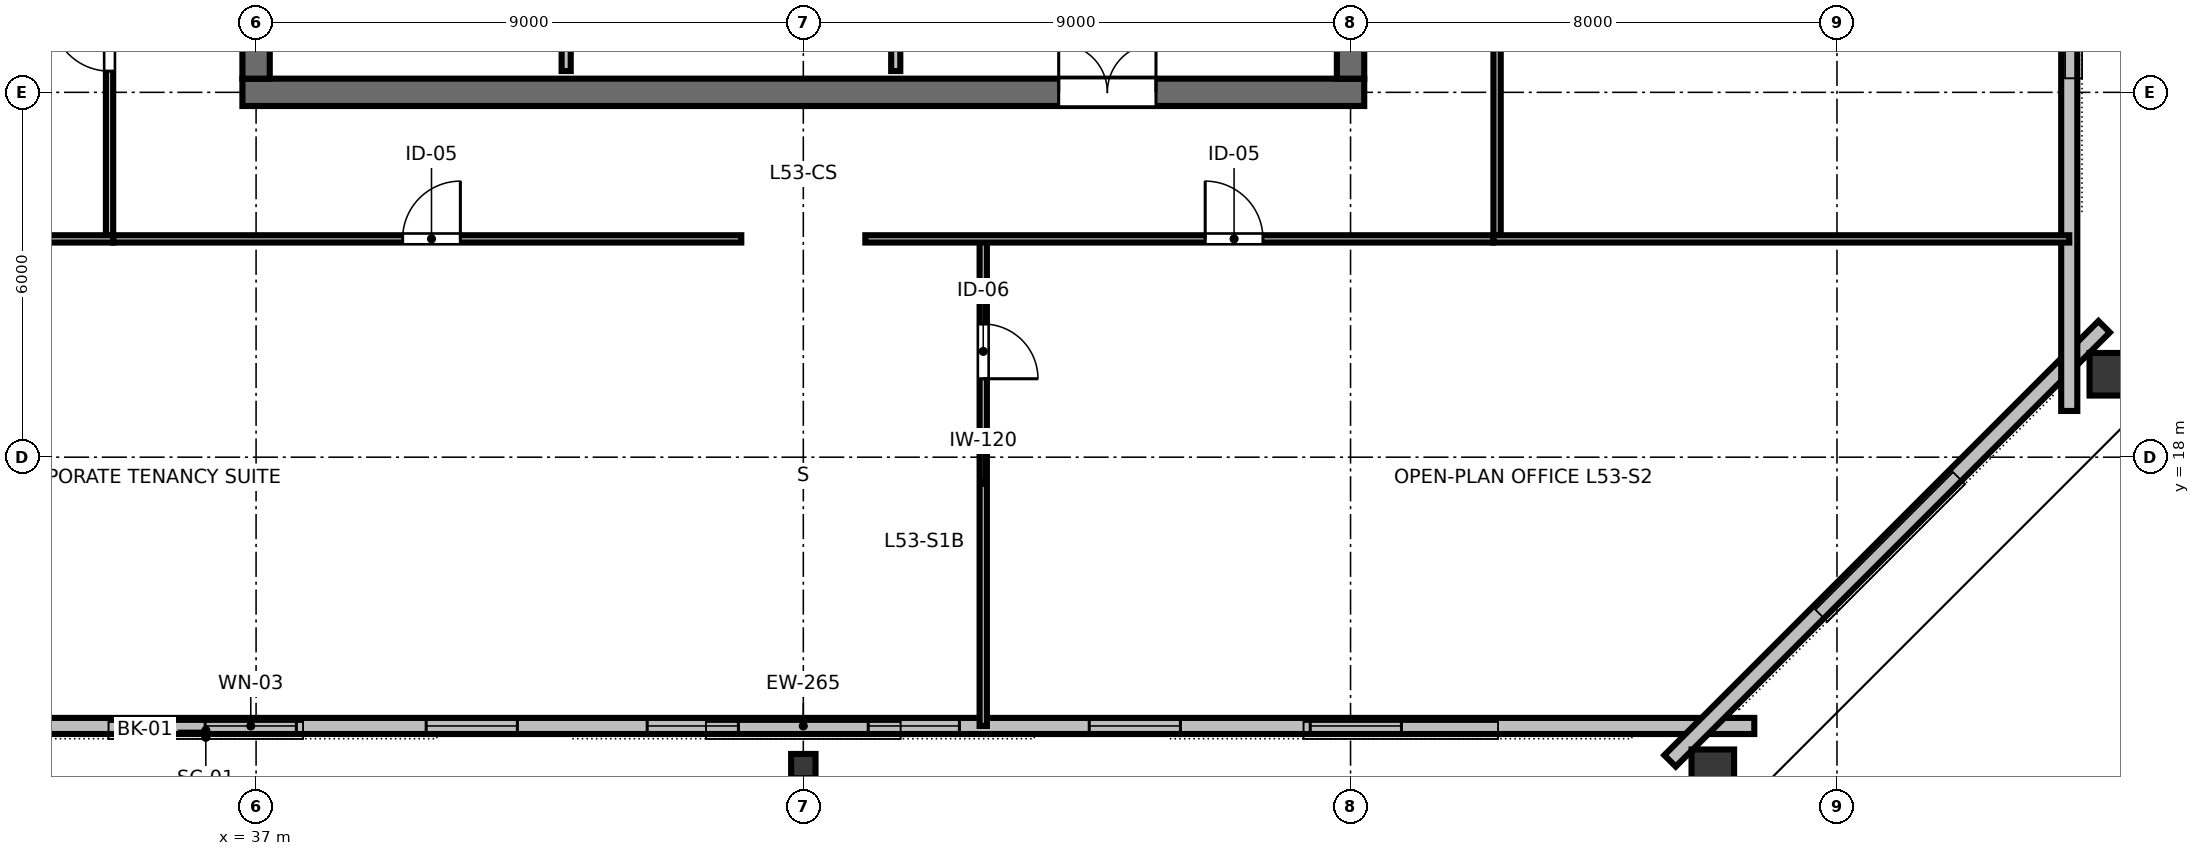
"""IFC4 building model, lengths in metres.
Left out: names, types, materials, properties, quantities, classifications, styles, units other than length and angle.
Written with IfcOpenShell. Run it as: python <this file> out.ifc"""

import sys

from ifc_helpers import new_model, si_unit, direction, frame, frame_2d, origin, origin_2d, place, context, subcontext, project, spatial, rectangle, hollow_rectangle, i_section, extrude, element, fill, save


model = new_model("IFC4")
c1 = context("Model", 3, precision=1e-05, world=origin(), true_north=direction((0.0, 1.0)))
c2 = subcontext(c1, "Body", "Model", "MODEL_VIEW")
j1 = project(units=[si_unit("LENGTHUNIT", "METRE"), si_unit("PLANEANGLEUNIT", "RADIAN")], contexts=[c1])
p1 = place(None, origin())
s1 = spatial("IfcSite", under=j1, at=p1, CompositionType="ELEMENT")
p2 = place(p1, origin())
s2 = spatial("IfcBuilding", under=s1, at=p2, CompositionType="ELEMENT")
p3 = place(p2, frame((0.0, 0.0, 202.2)))
s3 = spatial("IfcBuildingStorey", under=s2, at=p3, CompositionType="ELEMENT", Elevation=202.2)
p4 = place(p3, frame((36.775, 24.0, 0.0), z_axis=(0.0, 0.0, 1.0), x_axis=(1.0, 0.0, 0.0)))
e1 = element("IfcWall", 1, at=p4, inside=s3, PredefinedType="SHEAR", context=c2, shape_type="SweptSolid", body=[
    extrude(rectangle(XDim=18.45, YDim=0.45, at=frame_2d((9.225, 0.0))), origin(), (0.0, 0.0, 1.0), 3.36),
])
p5 = place(p4, frame((13.425, 0.0, 0.0)))
e2 = element("IfcOpeningElement", 2, at=p5, cuts=e1, PredefinedType="OPENING", context=c2, shape_type="SweptSolid", body=[
    extrude(rectangle(XDim=1.6, YDim=2.15, at=frame_2d((0.8, 1.075))), frame((0.0, 0.235, 0.0), z_axis=(0.0, -1.0, 0.0), x_axis=(1.0, 0.0, 0.0)), (0.0, 0.0, 1.0), 0.47),
])
p6 = place(p3, frame((37.0, 24.225, 0.0), z_axis=(0.0, 0.0, 1.0), x_axis=(0.0, 1.0, 0.0)))
e3 = element("IfcWall", 3, at=p6, inside=s3, PredefinedType="SHEAR", context=c2, shape_type="SweptSolid", body=[
    extrude(rectangle(XDim=15.55, YDim=0.45, at=frame_2d((7.775, 0.0))), origin(), (0.0, 0.0, 1.0), 3.36),
])
p7 = place(p6, frame((5.3, 0.0, 0.0)))
e4 = element("IfcOpeningElement", 4, at=p7, cuts=e3, PredefinedType="OPENING", context=c2, shape_type="SweptSolid", body=[
    extrude(rectangle(XDim=1.15, YDim=2.15, at=frame_2d((0.575, 1.075))), frame((0.0, 0.235, 0.0), z_axis=(0.0, -1.0, 0.0), x_axis=(1.0, 0.0, 0.0)), (0.0, 0.0, 1.0), 0.47),
])
p8 = place(p3, frame((55.0, 24.225, 0.0), z_axis=(0.0, 0.0, 1.0), x_axis=(0.0, 1.0, 0.0)))
e5 = element("IfcWall", 5, at=p8, inside=s3, PredefinedType="SHEAR", context=c2, shape_type="SweptSolid", body=[
    extrude(rectangle(XDim=15.55, YDim=0.45, at=frame_2d((7.775, 0.0))), origin(), (0.0, 0.0, 1.0), 3.36),
])
p9 = place(p8, frame((5.3, 0.0, 0.0)))
e6 = element("IfcOpeningElement", 6, at=p9, cuts=e5, PredefinedType="OPENING", context=c2, shape_type="SweptSolid", body=[
    extrude(rectangle(XDim=1.15, YDim=2.15, at=frame_2d((0.575, 1.075))), frame((0.0, 0.235, 0.0), z_axis=(0.0, -1.0, 0.0), x_axis=(1.0, 0.0, 0.0)), (0.0, 0.0, 1.0), 0.47),
])
p10 = place(p3, frame((46.0, 12.92, 0.0), z_axis=(0.0, 0.0, 1.0), x_axis=(1.0, 0.0, 0.0)))
e7 = element("IfcColumn", 7, at=p10, inside=s3, PredefinedType="COLUMN", context=c2, shape_type="SweptSolid", body=[
    extrude(i_section(OverallWidth=0.401, OverallDepth=0.399, WebThickness=0.025, FlangeThickness=0.04, FilletRadius=0.025, at=origin_2d()), origin(), (0.0, 0.0, 1.0), 3.373),
])
for number, where, z_axis, x_axis in (
    (8, (60.958, 12.768, 0.0), (0.0, 0.0, 1.0), (1.0, 0.0, 0.0)),
    (9, (67.579, 19.364, 0.0), (0.0, 0.0, 1.0), (0.0, 1.0, 0.0)),
):
    element("IfcColumn", number, at=place(p3, frame(where, z_axis=z_axis, x_axis=x_axis)), inside=s3, PredefinedType="COLUMN", context=c2, shape_type="SweptSolid", body=[
        extrude(hollow_rectangle(XDim=0.7, YDim=0.85, WallThickness=0.04, at=origin_2d()), origin(), (0.0, 0.0, 1.0), 3.373),
    ])
p11 = place(p3, frame((30.36, 13.58, 0.0), z_axis=(0.0, 0.0, 1.0), x_axis=(1.0, 0.0, 0.0)))
e10 = element("IfcWall", 10, at=p11, inside=s3, PredefinedType="STANDARD", context=c2, shape_type="SweptSolid", body=[
    extrude(rectangle(XDim=31.28, YDim=0.265, at=frame_2d((15.64, 0.0))), origin(), (0.0, 0.0, 1.0), 3.375),
])
p12 = place(p11, frame((5.802, 0.0, 0.85)))
e11 = element("IfcOpeningElement", 11, at=p12, cuts=e10, PredefinedType="OPENING", context=c2, shape_type="SweptSolid", body=[
    extrude(rectangle(XDim=1.5, YDim=1.85, at=frame_2d((0.75, 0.925))), frame((0.0, 0.142, 0.0), z_axis=(0.0, -1.0, 0.0), x_axis=(1.0, 0.0, 0.0)), (0.0, 0.0, 1.0), 0.285),
])
p13 = place(p11, frame((9.438, 0.0, 0.85)))
e12 = element("IfcOpeningElement", 12, at=p13, cuts=e10, PredefinedType="OPENING", context=c2, shape_type="SweptSolid", body=[
    extrude(rectangle(XDim=1.5, YDim=1.85, at=frame_2d((0.75, 0.925))), frame((0.0, 0.142, 0.0), z_axis=(0.0, -1.0, 0.0), x_axis=(1.0, 0.0, 0.0)), (0.0, 0.0, 1.0), 0.285),
])
p14 = place(p11, frame((13.073, 0.0, 0.85)))
e13 = element("IfcOpeningElement", 13, at=p14, cuts=e10, PredefinedType="OPENING", context=c2, shape_type="SweptSolid", body=[
    extrude(rectangle(XDim=1.5, YDim=1.85, at=frame_2d((0.75, 0.925))), frame((0.0, 0.142, 0.0), z_axis=(0.0, -1.0, 0.0), x_axis=(1.0, 0.0, 0.0)), (0.0, 0.0, 1.0), 0.285),
])
p15 = place(p11, frame((16.708, 0.0, 0.85)))
e14 = element("IfcOpeningElement", 14, at=p15, cuts=e10, PredefinedType="OPENING", context=c2, shape_type="SweptSolid", body=[
    extrude(rectangle(XDim=1.5, YDim=1.85, at=frame_2d((0.75, 0.925))), frame((0.0, 0.142, 0.0), z_axis=(0.0, -1.0, 0.0), x_axis=(1.0, 0.0, 0.0)), (0.0, 0.0, 1.0), 0.285),
])
p16 = place(p11, frame((20.343, 0.0, 0.85)))
e15 = element("IfcOpeningElement", 15, at=p16, cuts=e10, PredefinedType="OPENING", context=c2, shape_type="SweptSolid", body=[
    extrude(rectangle(XDim=1.5, YDim=1.85, at=frame_2d((0.75, 0.925))), frame((0.0, 0.142, 0.0), z_axis=(0.0, -1.0, 0.0), x_axis=(1.0, 0.0, 0.0)), (0.0, 0.0, 1.0), 0.285),
])
p17 = place(p11, frame((23.978, 0.0, 0.85)))
e16 = element("IfcOpeningElement", 16, at=p17, cuts=e10, PredefinedType="OPENING", context=c2, shape_type="SweptSolid", body=[
    extrude(rectangle(XDim=1.5, YDim=1.85, at=frame_2d((0.75, 0.925))), frame((0.0, 0.142, 0.0), z_axis=(0.0, -1.0, 0.0), x_axis=(1.0, 0.0, 0.0)), (0.0, 0.0, 1.0), 0.285),
])
p18 = place(p3, frame((60.254, 13.006, 0.0), z_axis=(0.0, 0.0, 1.0), x_axis=(0.707106781187, 0.707106781187, 0.0)))
e17 = element("IfcWall", 17, at=p18, inside=s3, PredefinedType="STANDARD", context=c2, shape_type="SweptSolid", body=[
    extrude(rectangle(XDim=10.097, YDim=0.265, at=frame_2d((5.048, 0.0))), origin(), (0.0, 0.0, 1.0), 3.375),
])
p19 = place(p3, frame((66.82, 18.76, 0.0), z_axis=(0.0, 0.0, 1.0), x_axis=(0.0, 1.0, 0.0)))
e18 = element("IfcWall", 18, at=p19, inside=s3, PredefinedType="STANDARD", context=c2, shape_type="SweptSolid", body=[
    extrude(rectangle(XDim=26.48, YDim=0.265, at=frame_2d((13.24, 0.0))), origin(), (0.0, 0.0, 1.0), 3.375),
])
p20 = place(p19, frame((6.42, 0.0, 0.85)))
e19 = element("IfcOpeningElement", 19, at=p20, cuts=e18, PredefinedType="OPENING", context=c2, shape_type="SweptSolid", body=[
    extrude(rectangle(XDim=1.5, YDim=1.85, at=frame_2d((0.75, 0.925))), frame((0.0, 0.142, 0.0), z_axis=(0.0, -1.0, 0.0), x_axis=(1.0, 0.0, 0.0)), (0.0, 0.0, 1.0), 0.285),
])
p21 = place(p19, frame((10.467, 0.0, 0.85)))
e20 = element("IfcOpeningElement", 20, at=p21, cuts=e18, PredefinedType="OPENING", context=c2, shape_type="SweptSolid", body=[
    extrude(rectangle(XDim=1.5, YDim=1.85, at=frame_2d((0.75, 0.925))), frame((0.0, 0.142, 0.0), z_axis=(0.0, -1.0, 0.0), x_axis=(1.0, 0.0, 0.0)), (0.0, 0.0, 1.0), 0.285),
])
p22 = place(p19, frame((18.56, 0.0, 0.85)))
e21 = element("IfcOpeningElement", 21, at=p22, cuts=e18, PredefinedType="OPENING", context=c2, shape_type="SweptSolid", body=[
    extrude(rectangle(XDim=1.5, YDim=1.85, at=frame_2d((0.75, 0.925))), frame((0.0, 0.142, 0.0), z_axis=(0.0, -1.0, 0.0), x_axis=(1.0, 0.0, 0.0)), (0.0, 0.0, 1.0), 0.285),
])
p23 = place(p3, frame((42.1, 24.35, 0.0), z_axis=(0.0, 0.0, 1.0), x_axis=(0.0, 1.0, 0.0)))
e22 = element("IfcWall", 22, at=p23, inside=s3, PredefinedType="PARTITIONING", context=c2, shape_type="SweptSolid", body=[
    extrude(rectangle(XDim=3.9, YDim=0.15, at=frame_2d((1.95, 0.0))), origin(), (0.0, 0.0, 1.0), 3.375),
])
p24 = place(p23, frame((1.5, 0.0, 0.0)))
e23 = element("IfcOpeningElement", 23, at=p24, cuts=e22, PredefinedType="OPENING", context=c2, shape_type="SweptSolid", body=[
    extrude(rectangle(XDim=0.9, YDim=2.15, at=frame_2d((0.45, 1.075))), frame((0.0, 0.085, 0.0), z_axis=(0.0, -1.0, 0.0), x_axis=(1.0, 0.0, 0.0)), (0.0, 0.0, 1.0), 0.17),
])
p25 = place(p3, frame((47.52, 24.35, 0.0), z_axis=(0.0, 0.0, 1.0), x_axis=(0.0, 1.0, 0.0)))
e24 = element("IfcWall", 24, at=p25, inside=s3, PredefinedType="PARTITIONING", context=c2, shape_type="SweptSolid", body=[
    extrude(rectangle(XDim=3.9, YDim=0.15, at=frame_2d((1.95, 0.0))), origin(), (0.0, 0.0, 1.0), 3.375),
])
p26 = place(p25, frame((0.35, 0.0, 0.0)))
e25 = element("IfcOpeningElement", 25, at=p26, cuts=e24, PredefinedType="OPENING", context=c2, shape_type="SweptSolid", body=[
    extrude(rectangle(XDim=0.9, YDim=2.15, at=frame_2d((0.45, 1.075))), frame((0.0, 0.085, 0.0), z_axis=(0.0, -1.0, 0.0), x_axis=(1.0, 0.0, 0.0)), (0.0, 0.0, 1.0), 0.17),
])
p27 = place(p3, frame((48.959, 21.59, 0.0), z_axis=(0.0, 0.0, 1.0), x_axis=(0.0, -1.0, 0.0)))
e26 = element("IfcWall", 26, at=p27, inside=s3, PredefinedType="PARTITIONING", context=c2, shape_type="SweptSolid", body=[
    extrude(rectangle(XDim=8.01, YDim=0.12, at=frame_2d((4.005, 0.0))), origin(), (0.0, 0.0, 1.0), 2.655),
])
p28 = place(p27, frame((1.4, 0.0, 0.0)))
e27 = element("IfcOpeningElement", 27, at=p28, cuts=e26, PredefinedType="OPENING", context=c2, shape_type="SweptSolid", body=[
    extrude(rectangle(XDim=0.9, YDim=2.15, at=frame_2d((0.45, 1.075))), frame((0.0, 0.07, 0.0), z_axis=(0.0, -1.0, 0.0), x_axis=(1.0, 0.0, 0.0)), (0.0, 0.0, 1.0), 0.14),
])
p29 = place(p3, frame((34.65, 21.59, 0.0), z_axis=(0.0, 0.0, 1.0), x_axis=(1.0, 0.0, 0.0)))
e28 = element("IfcWall", 28, at=p29, inside=s3, PredefinedType="PARTITIONING", context=c2, shape_type="SweptSolid", body=[
    extrude(rectangle(XDim=10.33, YDim=0.12, at=frame_2d((5.165, 0.0))), origin(), (0.0, 0.0, 1.0), 2.655),
])
p30 = place(p29, frame((4.76, 0.0, 0.0)))
e29 = element("IfcOpeningElement", 29, at=p30, cuts=e28, PredefinedType="OPENING", context=c2, shape_type="SweptSolid", body=[
    extrude(rectangle(XDim=0.95, YDim=2.15, at=frame_2d((0.475, 1.075))), frame((0.0, 0.07, 0.0), z_axis=(0.0, -1.0, 0.0), x_axis=(1.0, 0.0, 0.0)), (0.0, 0.0, 1.0), 0.14),
])
p31 = place(p3, frame((47.02, 21.59, 0.0), z_axis=(0.0, 0.0, 1.0), x_axis=(1.0, 0.0, 0.0)))
e30 = element("IfcWall", 30, at=p31, inside=s3, PredefinedType="PARTITIONING", context=c2, shape_type="SweptSolid", body=[
    extrude(rectangle(XDim=10.33, YDim=0.12, at=frame_2d((5.165, 0.0))), origin(), (0.0, 0.0, 1.0), 2.655),
])
p32 = place(p31, frame((5.59, 0.0, 0.0)))
e31 = element("IfcOpeningElement", 31, at=p32, cuts=e30, PredefinedType="OPENING", context=c2, shape_type="SweptSolid", body=[
    extrude(rectangle(XDim=0.95, YDim=2.15, at=frame_2d((0.475, 1.075))), frame((0.0, 0.07, 0.0), z_axis=(0.0, -1.0, 0.0), x_axis=(1.0, 0.0, 0.0)), (0.0, 0.0, 1.0), 0.14),
])
p33 = place(p3, frame((34.59, 21.65, 0.0), z_axis=(0.0, 0.0, 1.0), x_axis=(0.0, 1.0, 0.0)))
e32 = element("IfcWall", 32, at=p33, inside=s3, PredefinedType="PARTITIONING", context=c2, shape_type="SweptSolid", body=[
    extrude(rectangle(XDim=20.7, YDim=0.12, at=frame_2d((10.35, 0.0))), origin(), (0.0, 0.0, 1.0), 2.655),
])
p34 = place(p33, frame((2.698, 0.0, 0.0)))
e33 = element("IfcOpeningElement", 33, at=p34, cuts=e32, PredefinedType="OPENING", context=c2, shape_type="SweptSolid", body=[
    extrude(rectangle(XDim=0.95, YDim=2.15, at=frame_2d((0.475, 1.075))), frame((0.0, 0.07, 0.0), z_axis=(0.0, -1.0, 0.0), x_axis=(1.0, 0.0, 0.0)), (0.0, 0.0, 1.0), 0.14),
])
p35 = place(p33, frame((8.556, 0.0, 0.0)))
e34 = element("IfcOpeningElement", 34, at=p35, cuts=e32, PredefinedType="OPENING", context=c2, shape_type="SweptSolid", body=[
    extrude(rectangle(XDim=0.95, YDim=2.15, at=frame_2d((0.475, 1.075))), frame((0.0, 0.07, 0.0), z_axis=(0.0, -1.0, 0.0), x_axis=(1.0, 0.0, 0.0)), (0.0, 0.0, 1.0), 0.14),
])
p36 = place(p33, frame((15.733, 0.0, 0.0)))
e35 = element("IfcOpeningElement", 35, at=p36, cuts=e32, PredefinedType="OPENING", context=c2, shape_type="SweptSolid", body=[
    extrude(rectangle(XDim=0.95, YDim=2.15, at=frame_2d((0.475, 1.075))), frame((0.0, 0.07, 0.0), z_axis=(0.0, -1.0, 0.0), x_axis=(1.0, 0.0, 0.0)), (0.0, 0.0, 1.0), 0.14),
])
p37 = place(p3, frame((57.41, 21.65, 0.0), z_axis=(0.0, 0.0, 1.0), x_axis=(0.0, 1.0, 0.0)))
e36 = element("IfcWall", 36, at=p37, inside=s3, PredefinedType="PARTITIONING", context=c2, shape_type="SweptSolid", body=[
    extrude(rectangle(XDim=20.7, YDim=0.12, at=frame_2d((10.35, 0.0))), origin(), (0.0, 0.0, 1.0), 2.655),
])
p38 = place(p37, frame((5.525, 0.0, 0.0)))
e37 = element("IfcOpeningElement", 37, at=p38, cuts=e36, PredefinedType="OPENING", context=c2, shape_type="SweptSolid", body=[
    extrude(rectangle(XDim=0.95, YDim=2.15, at=frame_2d((0.475, 1.075))), frame((0.0, 0.07, 0.0), z_axis=(0.0, -1.0, 0.0), x_axis=(1.0, 0.0, 0.0)), (0.0, 0.0, 1.0), 0.14),
])
p39 = place(p37, frame((15.675, 0.0, 0.0)))
e38 = element("IfcOpeningElement", 38, at=p39, cuts=e36, PredefinedType="OPENING", context=c2, shape_type="SweptSolid", body=[
    extrude(rectangle(XDim=0.95, YDim=2.15, at=frame_2d((0.475, 1.075))), frame((0.0, 0.07, 0.0), z_axis=(0.0, -1.0, 0.0), x_axis=(1.0, 0.0, 0.0)), (0.0, 0.0, 1.0), 0.14),
])
for number, where, z_axis, x_axis in (
    (39, (34.65, 21.59, 0.0), (0.0, 0.0, 1.0), (-1.0, 0.0, 0.0)),
    (40, (57.35, 21.59, 0.0), (0.0, 0.0, 1.0), (1.0, 0.0, 0.0)),
):
    element("IfcWall", number, at=place(p3, frame(where, z_axis=z_axis, x_axis=x_axis)), inside=s3, PredefinedType="PARTITIONING", context=c2, shape_type="SweptSolid", body=[
        extrude(rectangle(XDim=9.47, YDim=0.12, at=frame_2d((4.735, 0.0))), origin(), (0.0, 0.0, 1.0), 2.655),
    ])
p40 = place(p12, origin())
e41 = element("IfcWindow", 41, at=p40, inside=s3, PartitioningType="SINGLE_PANEL", PredefinedType="WINDOW", context=c2, shape_type="SweptSolid", body=[
    extrude(rectangle(XDim=1.5, YDim=1.85, at=frame_2d((0.75, 0.925))), frame((0.0, 0.03, 0.0), z_axis=(0.0, -1.0, 0.0), x_axis=(1.0, 0.0, 0.0)), (0.0, 0.0, 1.0), 0.06),
])
fill(e11, e41)
p41 = place(p13, origin())
e42 = element("IfcWindow", 42, at=p41, inside=s3, PartitioningType="SINGLE_PANEL", PredefinedType="WINDOW", context=c2, shape_type="SweptSolid", body=[
    extrude(rectangle(XDim=1.5, YDim=1.85, at=frame_2d((0.75, 0.925))), frame((0.0, 0.03, 0.0), z_axis=(0.0, -1.0, 0.0), x_axis=(1.0, 0.0, 0.0)), (0.0, 0.0, 1.0), 0.06),
])
fill(e12, e42)
p42 = place(p14, origin())
e43 = element("IfcWindow", 43, at=p42, inside=s3, PartitioningType="SINGLE_PANEL", PredefinedType="WINDOW", context=c2, shape_type="SweptSolid", body=[
    extrude(rectangle(XDim=1.5, YDim=1.85, at=frame_2d((0.75, 0.925))), frame((0.0, 0.03, 0.0), z_axis=(0.0, -1.0, 0.0), x_axis=(1.0, 0.0, 0.0)), (0.0, 0.0, 1.0), 0.06),
])
fill(e13, e43)
p43 = place(p15, origin())
e44 = element("IfcWindow", 44, at=p43, inside=s3, PartitioningType="SINGLE_PANEL", PredefinedType="WINDOW", context=c2, shape_type="SweptSolid", body=[
    extrude(rectangle(XDim=1.5, YDim=1.85, at=frame_2d((0.75, 0.925))), frame((0.0, 0.03, 0.0), z_axis=(0.0, -1.0, 0.0), x_axis=(1.0, 0.0, 0.0)), (0.0, 0.0, 1.0), 0.06),
])
fill(e14, e44)
p44 = place(p16, origin())
e45 = element("IfcWindow", 45, at=p44, inside=s3, PartitioningType="SINGLE_PANEL", PredefinedType="WINDOW", context=c2, shape_type="SweptSolid", body=[
    extrude(rectangle(XDim=1.5, YDim=1.85, at=frame_2d((0.75, 0.925))), frame((0.0, 0.03, 0.0), z_axis=(0.0, -1.0, 0.0), x_axis=(1.0, 0.0, 0.0)), (0.0, 0.0, 1.0), 0.06),
])
fill(e15, e45)
p45 = place(p17, origin())
e46 = element("IfcWindow", 46, at=p45, inside=s3, PartitioningType="SINGLE_PANEL", PredefinedType="WINDOW", context=c2, shape_type="SweptSolid", body=[
    extrude(rectangle(XDim=1.5, YDim=1.85, at=frame_2d((0.75, 0.925))), frame((0.0, 0.03, 0.0), z_axis=(0.0, -1.0, 0.0), x_axis=(1.0, 0.0, 0.0)), (0.0, 0.0, 1.0), 0.06),
])
fill(e16, e46)
p46 = place(p5, origin())
e47 = element("IfcDoor", 47, at=p46, inside=s3, OperationType="DOUBLE_DOOR_SINGLE_SWING", PredefinedType="DOOR", context=c2, shape_type="SweptSolid", body=[
    extrude(rectangle(XDim=1.6, YDim=2.15, at=frame_2d((0.8, 1.075))), frame((0.0, 0.025, 0.0), z_axis=(0.0, -1.0, 0.0), x_axis=(1.0, 0.0, 0.0)), (0.0, 0.0, 1.0), 0.05),
])
fill(e2, e47)
p47 = place(p28, origin())
e48 = element("IfcDoor", 48, at=p47, inside=s3, OperationType="SINGLE_SWING_RIGHT", PredefinedType="DOOR", context=c2, shape_type="SweptSolid", body=[
    extrude(rectangle(XDim=0.9, YDim=2.15, at=frame_2d((0.45, 1.075))), frame((0.0, 0.025, 0.0), z_axis=(0.0, -1.0, 0.0), x_axis=(1.0, 0.0, 0.0)), (0.0, 0.0, 1.0), 0.05),
])
fill(e27, e48)
p48 = place(p30, origin())
e49 = element("IfcDoor", 49, at=p48, inside=s3, OperationType="SINGLE_SWING_RIGHT", PredefinedType="DOOR", context=c2, shape_type="SweptSolid", body=[
    extrude(rectangle(XDim=0.95, YDim=2.15, at=frame_2d((0.475, 1.075))), frame((0.0, 0.025, 0.0), z_axis=(0.0, -1.0, 0.0), x_axis=(1.0, 0.0, 0.0)), (0.0, 0.0, 1.0), 0.05),
])
fill(e29, e49)
p49 = place(p32, origin())
e50 = element("IfcDoor", 50, at=p49, inside=s3, OperationType="SINGLE_SWING_LEFT", PredefinedType="DOOR", context=c2, shape_type="SweptSolid", body=[
    extrude(rectangle(XDim=0.95, YDim=2.15, at=frame_2d((0.475, 1.075))), frame((0.0, 0.025, 0.0), z_axis=(0.0, -1.0, 0.0), x_axis=(1.0, 0.0, 0.0)), (0.0, 0.0, 1.0), 0.05),
])
fill(e31, e50)
p50 = place(p34, origin())
e51 = element("IfcDoor", 51, at=p50, inside=s3, OperationType="SINGLE_SWING_RIGHT", PredefinedType="DOOR", context=c2, shape_type="SweptSolid", body=[
    extrude(rectangle(XDim=0.95, YDim=2.15, at=frame_2d((0.475, 1.075))), frame((0.0, 0.025, 0.0), z_axis=(0.0, -1.0, 0.0), x_axis=(1.0, 0.0, 0.0)), (0.0, 0.0, 1.0), 0.05),
])
fill(e33, e51)
save(model, sys.argv[1])
